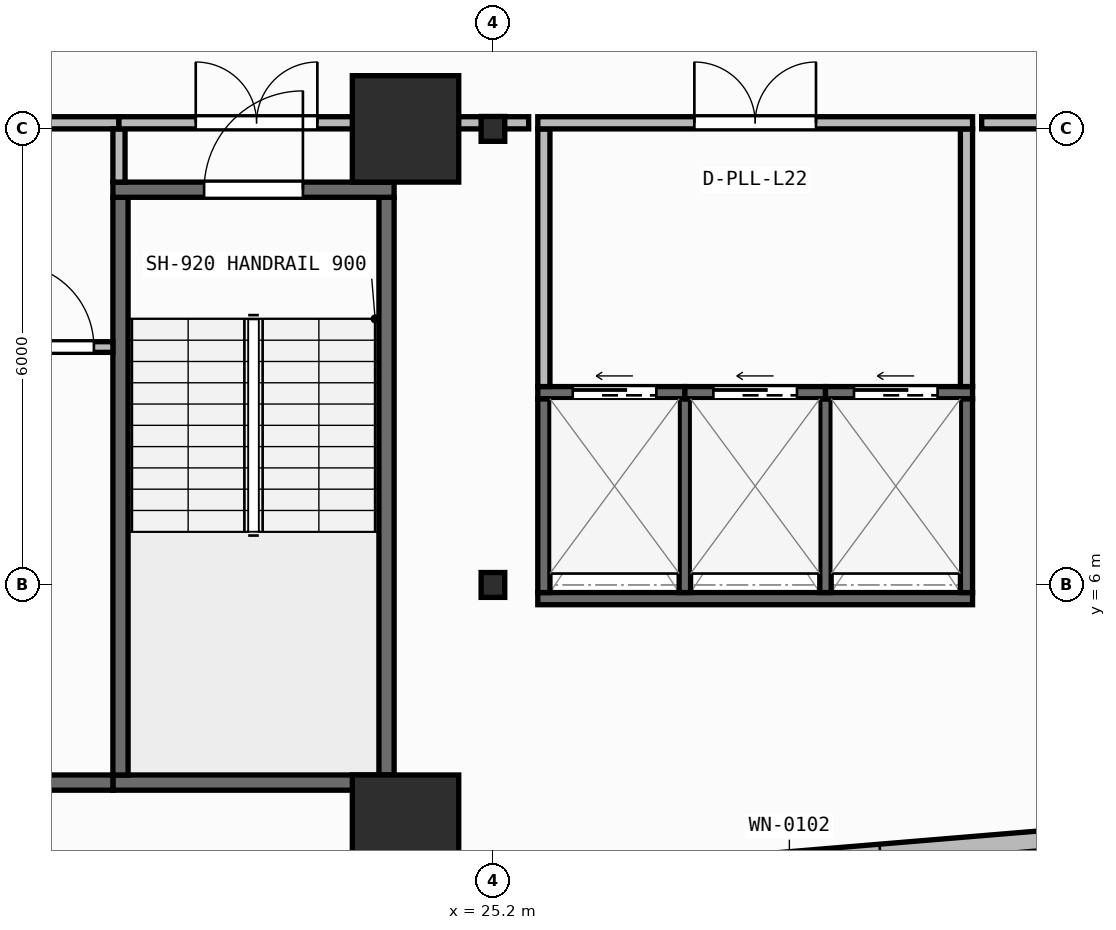
"""IFC4 building model, lengths in metres.
Left out: names, types, materials, properties, quantities, classifications, styles, units other than length and angle.
Written with IfcOpenShell. Run it as: python <this file> out.ifc"""

import sys

from ifc_helpers import new_model, si_unit, direction, frame, frame_2d, origin, origin_2d, place, context, subcontext, project, spatial, rectangle, i_section, extrude, element, fill, save


model = new_model("IFC4")
c1 = context("Model", 3, precision=1e-05, world=origin(), true_north=direction((0.0, 1.0)))
c2 = subcontext(c1, "Body", "Model", "MODEL_VIEW")
j1 = project(units=[si_unit("LENGTHUNIT", "METRE"), si_unit("PLANEANGLEUNIT", "RADIAN")], contexts=[c1])
p1 = place(None, origin())
s1 = spatial("IfcSite", under=j1, at=p1, CompositionType="ELEMENT")
p2 = place(p1, origin())
s2 = spatial("IfcBuilding", under=s1, at=p2, CompositionType="ELEMENT")
p3 = place(p2, frame((0.0, 0.0, 89.65)))
s3 = spatial("IfcBuildingStorey", under=s2, at=p3, CompositionType="ELEMENT", Elevation=89.65)
p4 = place(p3, frame((24.05, 2.8, 0.0), z_axis=(0.0, 0.0, 1.0), x_axis=(1.0, 0.0, 0.0)))
e1 = element("IfcColumn", 1, at=p4, inside=s3, PredefinedType="COLUMN", context=c2, shape_type="SweptSolid", body=[
    extrude(rectangle(XDim=1.4, YDim=1.4, at=origin_2d()), origin(), (0.0, 0.0, 1.0), 3.95),
])
p5 = place(p3, frame((25.2, 6.0, 0.0), z_axis=(0.0, 0.0, 1.0), x_axis=(1.0, 0.0, 0.0)))
e2 = element("IfcColumn", 2, at=p5, inside=s3, PredefinedType="COLUMN", context=c2, shape_type="SweptSolid", body=[
    extrude(i_section(OverallWidth=0.311, OverallDepth=0.327, WebThickness=0.016, FlangeThickness=0.025, FilletRadius=0.017, at=origin_2d()), origin(), (0.0, 0.0, 1.0), 3.95),
])
p6 = place(p3, frame((24.05, 12.0, 0.0), z_axis=(0.0, 0.0, 1.0), x_axis=(1.0, 0.0, 0.0)))
e3 = element("IfcColumn", 3, at=p6, inside=s3, PredefinedType="COLUMN", context=c2, shape_type="SweptSolid", body=[
    extrude(rectangle(XDim=1.4, YDim=1.4, at=origin_2d()), origin(), (0.0, 0.0, 1.0), 3.95),
])
p7 = place(p3, frame((25.2, 12.0, 0.0), z_axis=(0.0, 0.0, 1.0), x_axis=(1.0, 0.0, 0.0)))
e4 = element("IfcColumn", 4, at=p7, inside=s3, PredefinedType="COLUMN", context=c2, shape_type="SweptSolid", body=[
    extrude(i_section(OverallWidth=0.311, OverallDepth=0.327, WebThickness=0.016, FlangeThickness=0.025, FilletRadius=0.017, at=origin_2d()), origin(), (0.0, 0.0, 1.0), 3.95),
])
p8 = place(p3, frame((2.76, 0.174, 0.0), z_axis=(0.0, 0.0, 1.0), x_axis=(0.996571478456, 0.082736257641, 0.0)))
e5 = element("IfcWall", 5, at=p8, inside=s3, PredefinedType="STANDARD", context=c2, shape_type="SweptSolid", body=[
    extrude(rectangle(XDim=52.861, YDim=0.26, at=frame_2d((26.431, 0.0))), origin(), (0.0, 0.0, 1.0), 3.71),
])
p9 = place(p8, frame((25.231, 0.0, 0.9)))
e6 = element("IfcOpeningElement", 6, at=p9, cuts=e5, PredefinedType="OPENING", context=c2, shape_type="SweptSolid", body=[
    extrude(rectangle(XDim=2.4, YDim=1.65, at=frame_2d((1.2, 0.825))), frame((0.0, 0.14, 0.0), z_axis=(0.0, -1.0, 0.0), x_axis=(1.0, 0.0, 0.0)), (0.0, 0.0, 1.0), 0.28),
])
p10 = place(p3, frame((20.2, 3.4, 0.0), z_axis=(0.0, 0.0, 1.0), x_axis=(1.0, 0.0, 0.0)))
e7 = element("IfcWall", 7, at=p10, inside=s3, PredefinedType="SHEAR", context=c2, shape_type="SweptSolid", body=[
    extrude(rectangle(XDim=3.7, YDim=0.2, at=frame_2d((1.85, 0.0))), origin(), (0.0, 0.0, 1.0), 3.71),
])
for number, where, z_axis, x_axis in (
    (8, (20.3, 3.5, 0.0), (0.0, 0.0, 1.0), (0.0, 1.0, 0.0)),
    (9, (23.8, 3.5, 0.0), (0.0, 0.0, 1.0), (0.0, 1.0, 0.0)),
):
    element("IfcWall", number, at=place(p3, frame(where, z_axis=z_axis, x_axis=x_axis)), inside=s3, PredefinedType="SHEAR", context=c2, shape_type="SweptSolid", body=[
        extrude(rectangle(XDim=7.6, YDim=0.2, at=frame_2d((3.8, 0.0))), origin(), (0.0, 0.0, 1.0), 3.71),
    ])
p11 = place(p3, frame((20.2, 11.2, 0.0), z_axis=(0.0, 0.0, 1.0), x_axis=(1.0, 0.0, 0.0)))
e10 = element("IfcWall", 10, at=p11, inside=s3, PredefinedType="SHEAR", context=c2, shape_type="SweptSolid", body=[
    extrude(rectangle(XDim=3.7, YDim=0.2, at=frame_2d((1.85, 0.0))), origin(), (0.0, 0.0, 1.0), 3.71),
])
p12 = place(p11, frame((1.2, 0.0, 0.0)))
e11 = element("IfcOpeningElement", 11, at=p12, cuts=e10, PredefinedType="OPENING", context=c2, shape_type="SweptSolid", body=[
    extrude(rectangle(XDim=1.3, YDim=2.15, at=frame_2d((0.65, 1.075))), frame((0.0, 0.11, 0.0), z_axis=(0.0, -1.0, 0.0), x_axis=(1.0, 0.0, 0.0)), (0.0, 0.0, 1.0), 0.22),
])
p13 = place(p3, frame((6.5, 3.4, 0.0), z_axis=(0.0, 0.0, 1.0), x_axis=(1.0, 0.0, 0.0)))
e12 = element("IfcWall", 12, at=p13, inside=s3, PredefinedType="SHEAR", context=c2, shape_type="SweptSolid", body=[
    extrude(rectangle(XDim=13.7, YDim=0.2, at=frame_2d((6.85, 0.0))), origin(), (0.0, 0.0, 1.0), 3.71),
])
p14 = place(p3, frame((25.79, 5.82, 0.0), z_axis=(0.0, 0.0, 1.0), x_axis=(1.0, 0.0, 0.0)))
e13 = element("IfcWall", 13, at=p14, inside=s3, PredefinedType="SHEAR", context=c2, shape_type="SweptSolid", body=[
    extrude(rectangle(XDim=5.72, YDim=0.16, at=frame_2d((2.86, 0.0))), origin(), (0.0, 0.0, 1.0), 3.71),
])
for number, where, z_axis, x_axis in (
    (14, (25.87, 5.9, 0.0), (0.0, 0.0, 1.0), (0.0, 1.0, 0.0)),
    (15, (31.43, 5.9, 0.0), (0.0, 0.0, 1.0), (0.0, 1.0, 0.0)),
):
    element("IfcWall", number, at=place(p3, frame(where, z_axis=z_axis, x_axis=x_axis)), inside=s3, PredefinedType="SHEAR", context=c2, shape_type="SweptSolid", body=[
        extrude(rectangle(XDim=2.55, YDim=0.16, at=frame_2d((1.275, 0.0))), origin(), (0.0, 0.0, 1.0), 3.71),
    ])
for number, where, z_axis, x_axis in (
    (16, (27.725, 5.9, 0.0), (0.0, 0.0, 1.0), (0.0, 1.0, 0.0)),
    (17, (29.575, 5.9, 0.0), (0.0, 0.0, 1.0), (0.0, 1.0, 0.0)),
):
    element("IfcWall", number, at=place(p3, frame(where, z_axis=z_axis, x_axis=x_axis)), inside=s3, PredefinedType="SHEAR", context=c2, shape_type="SweptSolid", body=[
        extrude(rectangle(XDim=2.55, YDim=0.15, at=frame_2d((1.275, 0.0))), origin(), (0.0, 0.0, 1.0), 3.71),
    ])
p15 = place(p3, frame((25.79, 8.53, 0.0), z_axis=(0.0, 0.0, 1.0), x_axis=(1.0, 0.0, 0.0)))
e18 = element("IfcWall", 18, at=p15, inside=s3, PredefinedType="SHEAR", context=c2, shape_type="SweptSolid", body=[
    extrude(rectangle(XDim=1.935, YDim=0.16, at=frame_2d((0.968, 0.0))), origin(), (0.0, 0.0, 1.0), 3.71),
])
p16 = place(p15, frame((0.46, 0.0, 0.0)))
e19 = element("IfcOpeningElement", 19, at=p16, cuts=e18, PredefinedType="OPENING", context=c2, shape_type="SweptSolid", body=[
    extrude(rectangle(XDim=1.1, YDim=2.15, at=frame_2d((0.55, 1.075))), frame((0.0, 0.09, 0.0), z_axis=(0.0, -1.0, 0.0), x_axis=(1.0, 0.0, 0.0)), (0.0, 0.0, 1.0), 0.18),
])
p17 = place(p3, frame((27.725, 8.53, 0.0), z_axis=(0.0, 0.0, 1.0), x_axis=(1.0, 0.0, 0.0)))
e20 = element("IfcWall", 20, at=p17, inside=s3, PredefinedType="SHEAR", context=c2, shape_type="SweptSolid", body=[
    extrude(rectangle(XDim=1.85, YDim=0.16, at=frame_2d((0.925, 0.0))), origin(), (0.0, 0.0, 1.0), 3.71),
])
p18 = place(p17, frame((0.375, 0.0, 0.0)))
e21 = element("IfcOpeningElement", 21, at=p18, cuts=e20, PredefinedType="OPENING", context=c2, shape_type="SweptSolid", body=[
    extrude(rectangle(XDim=1.1, YDim=2.15, at=frame_2d((0.55, 1.075))), frame((0.0, 0.09, 0.0), z_axis=(0.0, -1.0, 0.0), x_axis=(1.0, 0.0, 0.0)), (0.0, 0.0, 1.0), 0.18),
])
p19 = place(p3, frame((29.575, 8.53, 0.0), z_axis=(0.0, 0.0, 1.0), x_axis=(1.0, 0.0, 0.0)))
e22 = element("IfcWall", 22, at=p19, inside=s3, PredefinedType="SHEAR", context=c2, shape_type="SweptSolid", body=[
    extrude(rectangle(XDim=1.935, YDim=0.16, at=frame_2d((0.968, 0.0))), origin(), (0.0, 0.0, 1.0), 3.71),
])
p20 = place(p19, frame((0.375, 0.0, 0.0)))
e23 = element("IfcOpeningElement", 23, at=p20, cuts=e22, PredefinedType="OPENING", context=c2, shape_type="SweptSolid", body=[
    extrude(rectangle(XDim=1.1, YDim=2.15, at=frame_2d((0.55, 1.075))), frame((0.0, 0.09, 0.0), z_axis=(0.0, -1.0, 0.0), x_axis=(1.0, 0.0, 0.0)), (0.0, 0.0, 1.0), 0.18),
])
p21 = place(p3, frame((18.61, 9.13, 0.0), z_axis=(0.0, 0.0, 1.0), x_axis=(1.0, 0.0, 0.0)))
e24 = element("IfcWall", 24, at=p21, inside=s3, PredefinedType="PARTITIONING", context=c2, shape_type="SweptSolid", body=[
    extrude(rectangle(XDim=1.59, YDim=0.14, at=frame_2d((0.795, 0.0))), origin(), (0.0, 0.0, 1.0), 3.71),
])
p22 = place(p21, frame((0.24, 0.0, 0.0)))
e25 = element("IfcOpeningElement", 25, at=p22, cuts=e24, PredefinedType="OPENING", context=c2, shape_type="SweptSolid", body=[
    extrude(rectangle(XDim=1.1, YDim=2.1, at=frame_2d((0.55, 1.05))), frame((0.0, 0.08, 0.0), z_axis=(0.0, -1.0, 0.0), x_axis=(1.0, 0.0, 0.0)), (0.0, 0.0, 1.0), 0.16),
])
p23 = place(p3, frame((12.58, 12.08, 0.0), z_axis=(0.0, 0.0, 1.0), x_axis=(1.0, 0.0, 0.0)))
e26 = element("IfcWall", 26, at=p23, inside=s3, PredefinedType="PARTITIONING", context=c2, shape_type="SweptSolid", body=[
    extrude(rectangle(XDim=7.7, YDim=0.16, at=frame_2d((3.85, 0.0))), origin(), (0.0, 0.0, 1.0), 3.073),
])
p24 = place(p23, frame((3.05, 0.0, 0.0)))
e27 = element("IfcOpeningElement", 27, at=p24, cuts=e26, PredefinedType="OPENING", context=c2, shape_type="SweptSolid", body=[
    extrude(rectangle(XDim=1.6, YDim=2.05, at=frame_2d((0.8, 1.025))), frame((0.0, 0.09, 0.0), z_axis=(0.0, -1.0, 0.0), x_axis=(1.0, 0.0, 0.0)), (0.0, 0.0, 1.0), 0.18),
])
p25 = place(p3, frame((20.28, 11.3, 0.0), z_axis=(0.0, 0.0, 1.0), x_axis=(0.0, 1.0, 0.0)))
e28 = element("IfcWall", 28, at=p25, inside=s3, PredefinedType="PARTITIONING", context=c2, shape_type="SweptSolid", body=[
    extrude(rectangle(XDim=0.7, YDim=0.16, at=frame_2d((0.35, 0.0))), origin(), (0.0, 0.0, 1.0), 3.71),
])
p26 = place(p3, frame((20.28, 12.08, 0.0), z_axis=(0.0, 0.0, 1.0), x_axis=(1.0, 0.0, 0.0)))
e29 = element("IfcWall", 29, at=p26, inside=s3, PredefinedType="PARTITIONING", context=c2, shape_type="SweptSolid", body=[
    extrude(rectangle(XDim=3.62, YDim=0.16, at=frame_2d((1.81, 0.0))), origin(), (0.0, 0.0, 1.0), 3.073),
])
p27 = place(p26, frame((1.01, 0.0, 0.0)))
e30 = element("IfcOpeningElement", 30, at=p27, cuts=e29, PredefinedType="OPENING", context=c2, shape_type="SweptSolid", body=[
    extrude(rectangle(XDim=1.6, YDim=2.05, at=frame_2d((0.8, 1.025))), frame((0.0, 0.09, 0.0), z_axis=(0.0, -1.0, 0.0), x_axis=(1.0, 0.0, 0.0)), (0.0, 0.0, 1.0), 0.18),
])
p28 = place(p3, frame((23.82, 11.3, 0.0), z_axis=(0.0, 0.0, 1.0), x_axis=(0.0, 1.0, 0.0)))
e31 = element("IfcWall", 31, at=p28, inside=s3, PredefinedType="PARTITIONING", context=c2, shape_type="SweptSolid", body=[
    extrude(rectangle(XDim=0.7, YDim=0.16, at=frame_2d((0.35, 0.0))), origin(), (0.0, 0.0, 1.0), 3.71),
])
for number, where, z_axis, x_axis in (
    (32, (25.87, 8.61, 0.0), (0.0, 0.0, 1.0), (0.0, 1.0, 0.0)),
    (33, (31.43, 8.61, 0.0), (0.0, 0.0, 1.0), (0.0, 1.0, 0.0)),
):
    element("IfcWall", number, at=place(p3, frame(where, z_axis=z_axis, x_axis=x_axis)), inside=s3, PredefinedType="PARTITIONING", context=c2, shape_type="SweptSolid", body=[
        extrude(rectangle(XDim=3.39, YDim=0.16, at=frame_2d((1.695, 0.0))), origin(), (0.0, 0.0, 1.0), 3.71),
    ])
p29 = place(p3, frame((25.79, 12.08, 0.0), z_axis=(0.0, 0.0, 1.0), x_axis=(1.0, 0.0, 0.0)))
e34 = element("IfcWall", 34, at=p29, inside=s3, PredefinedType="PARTITIONING", context=c2, shape_type="SweptSolid", body=[
    extrude(rectangle(XDim=5.72, YDim=0.16, at=frame_2d((2.86, 0.0))), origin(), (0.0, 0.0, 1.0), 3.073),
])
p30 = place(p29, frame((2.06, 0.0, 0.0)))
e35 = element("IfcOpeningElement", 35, at=p30, cuts=e34, PredefinedType="OPENING", context=c2, shape_type="SweptSolid", body=[
    extrude(rectangle(XDim=1.6, YDim=2.05, at=frame_2d((0.8, 1.025))), frame((0.0, 0.09, 0.0), z_axis=(0.0, -1.0, 0.0), x_axis=(1.0, 0.0, 0.0)), (0.0, 0.0, 1.0), 0.18),
])
p31 = place(p3, frame((24.02, 12.08, 0.0), z_axis=(0.0, 0.0, 1.0), x_axis=(1.0, 0.0, 0.0)))
e36 = element("IfcWall", 36, at=p31, inside=s3, PredefinedType="PARTITIONING", context=c2, shape_type="SweptSolid", body=[
    extrude(rectangle(XDim=1.65, YDim=0.16, at=frame_2d((0.825, 0.0))), origin(), (0.0, 0.0, 1.0), 3.073),
])
p32 = place(p3, frame((31.63, 12.08, 0.0), z_axis=(0.0, 0.0, 1.0), x_axis=(1.0, 0.0, 0.0)))
e37 = element("IfcWall", 37, at=p32, inside=s3, PredefinedType="PARTITIONING", context=c2, shape_type="SweptSolid", body=[
    extrude(rectangle(XDim=11.181, YDim=0.16, at=frame_2d((5.59, 0.0))), origin(), (0.0, 0.0, 1.0), 3.073),
])
p33 = place(p12, origin())
e38 = element("IfcDoor", 38, at=p33, inside=s3, OperationType="SINGLE_SWING_RIGHT", PredefinedType="DOOR", context=c2, shape_type="SweptSolid", body=[
    extrude(rectangle(XDim=1.3, YDim=2.15, at=frame_2d((0.65, 1.075))), frame((0.0, 0.025, 0.0), z_axis=(0.0, -1.0, 0.0), x_axis=(1.0, 0.0, 0.0)), (0.0, 0.0, 1.0), 0.05),
])
fill(e11, e38)
p34 = place(p16, origin())
e39 = element("IfcDoor", 39, at=p34, inside=s3, OperationType="SLIDING_TO_LEFT", PredefinedType="DOOR", context=c2, shape_type="SweptSolid", body=[
    extrude(rectangle(XDim=1.1, YDim=2.15, at=frame_2d((0.55, 1.075))), frame((0.0, 0.025, 0.0), z_axis=(0.0, -1.0, 0.0), x_axis=(1.0, 0.0, 0.0)), (0.0, 0.0, 1.0), 0.05),
])
fill(e19, e39)
p35 = place(p18, origin())
e40 = element("IfcDoor", 40, at=p35, inside=s3, OperationType="SLIDING_TO_LEFT", PredefinedType="DOOR", context=c2, shape_type="SweptSolid", body=[
    extrude(rectangle(XDim=1.1, YDim=2.15, at=frame_2d((0.55, 1.075))), frame((0.0, 0.025, 0.0), z_axis=(0.0, -1.0, 0.0), x_axis=(1.0, 0.0, 0.0)), (0.0, 0.0, 1.0), 0.05),
])
fill(e21, e40)
p36 = place(p20, origin())
e41 = element("IfcDoor", 41, at=p36, inside=s3, OperationType="SLIDING_TO_LEFT", PredefinedType="DOOR", context=c2, shape_type="SweptSolid", body=[
    extrude(rectangle(XDim=1.1, YDim=2.15, at=frame_2d((0.55, 1.075))), frame((0.0, 0.025, 0.0), z_axis=(0.0, -1.0, 0.0), x_axis=(1.0, 0.0, 0.0)), (0.0, 0.0, 1.0), 0.05),
])
fill(e23, e41)
p37 = place(p22, origin())
e42 = element("IfcDoor", 42, at=p37, inside=s3, OperationType="SINGLE_SWING_LEFT", PredefinedType="DOOR", context=c2, shape_type="SweptSolid", body=[
    extrude(rectangle(XDim=1.1, YDim=2.1, at=frame_2d((0.55, 1.05))), frame((0.0, 0.025, 0.0), z_axis=(0.0, -1.0, 0.0), x_axis=(1.0, 0.0, 0.0)), (0.0, 0.0, 1.0), 0.05),
])
fill(e25, e42)
p38 = place(p27, origin())
e43 = element("IfcDoor", 43, at=p38, inside=s3, OperationType="DOUBLE_DOOR_SINGLE_SWING", PredefinedType="DOOR", context=c2, shape_type="SweptSolid", body=[
    extrude(rectangle(XDim=1.6, YDim=2.05, at=frame_2d((0.8, 1.025))), frame((0.0, 0.025, 0.0), z_axis=(0.0, -1.0, 0.0), x_axis=(1.0, 0.0, 0.0)), (0.0, 0.0, 1.0), 0.05),
])
fill(e30, e43)
p39 = place(p30, origin())
e44 = element("IfcDoor", 44, at=p39, inside=s3, OperationType="DOUBLE_DOOR_SINGLE_SWING", PredefinedType="DOOR", context=c2, shape_type="SweptSolid", body=[
    extrude(rectangle(XDim=1.6, YDim=2.05, at=frame_2d((0.8, 1.025))), frame((0.0, 0.025, 0.0), z_axis=(0.0, -1.0, 0.0), x_axis=(1.0, 0.0, 0.0)), (0.0, 0.0, 1.0), 0.05),
])
fill(e35, e44)
save(model, sys.argv[1])
